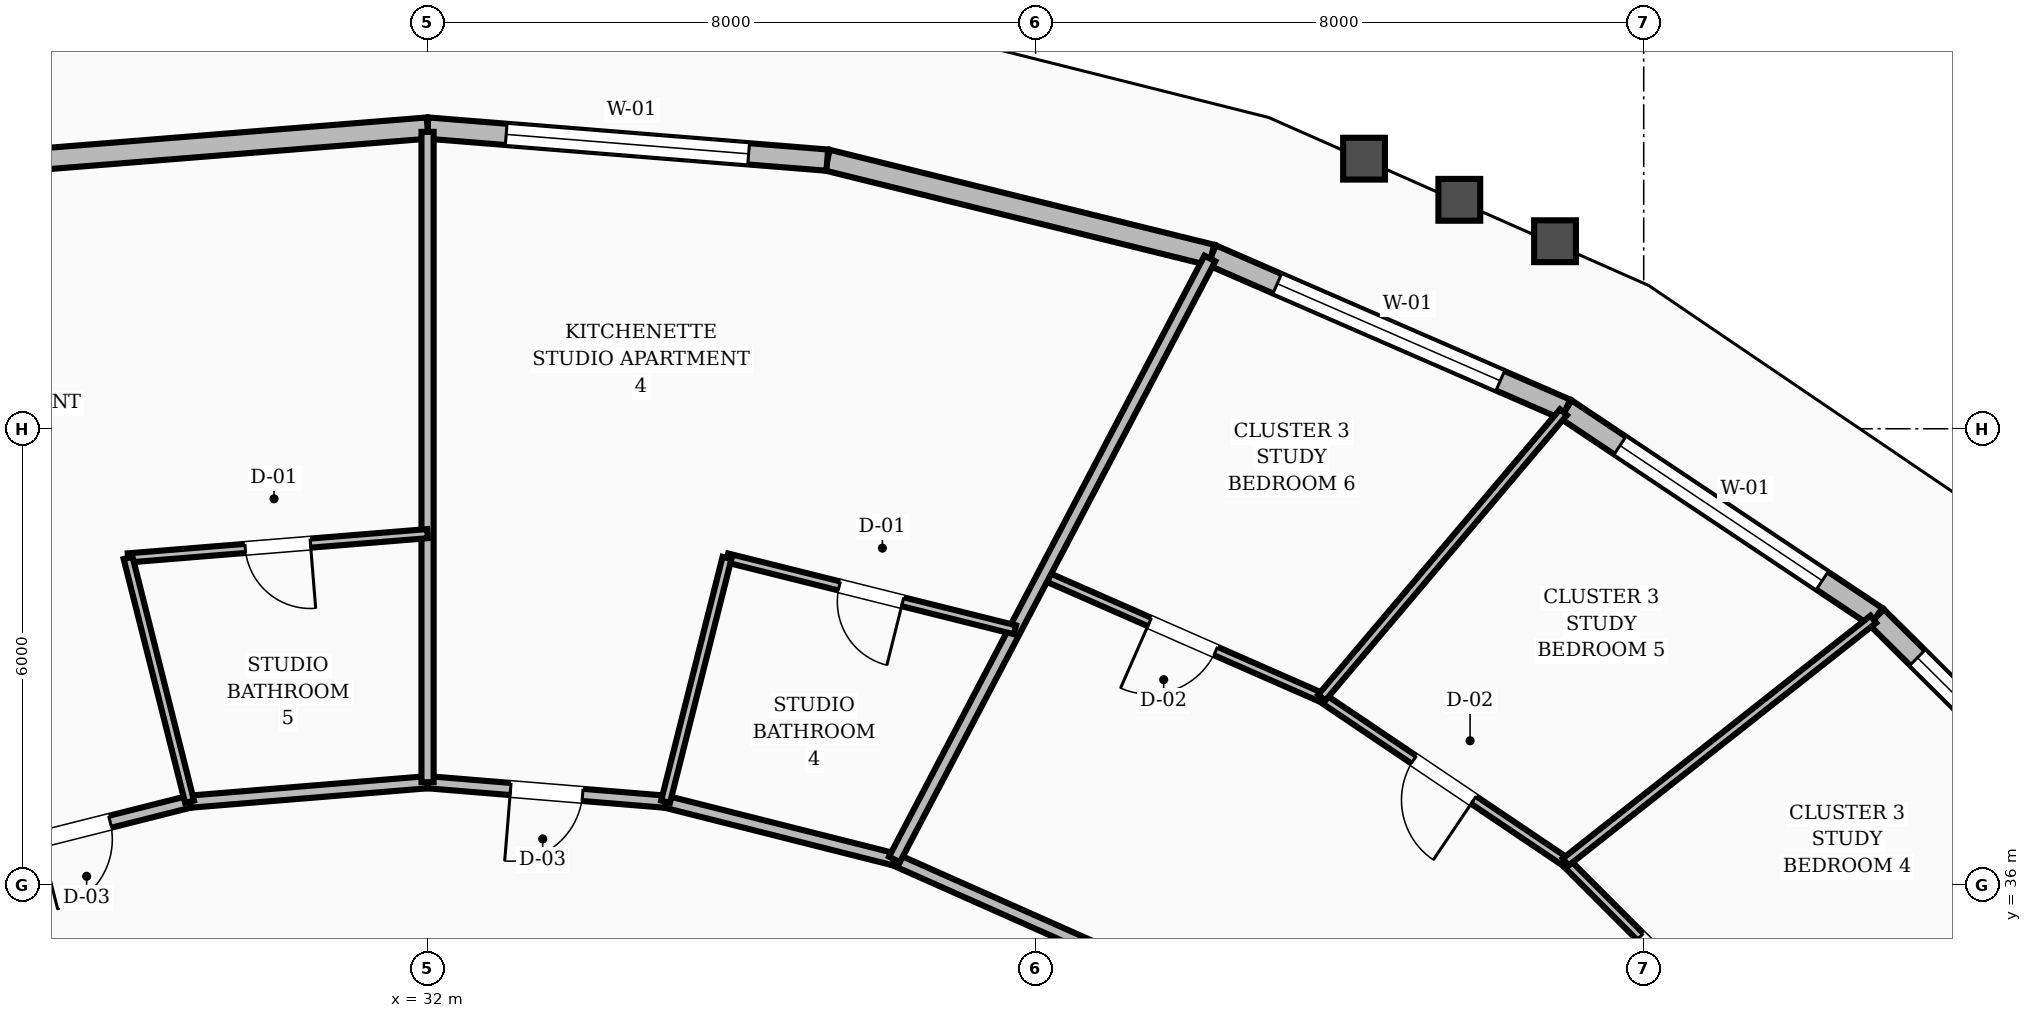
"""IFC4 building model, lengths in metres.
Left out: names, types, materials, properties, quantities, classifications, styles, units other than length and angle.
Written with IfcOpenShell. Run it as: python <this file> out.ifc"""

import sys

from ifc_helpers import new_model, si_unit, direction, frame, frame_2d, origin, place, context, subcontext, project, spatial, rectangle, extrude, element, fill, save


model = new_model("IFC4")
c1 = context("Model", 3, precision=1e-05, world=origin(), true_north=direction((0.0, 1.0)))
c2 = subcontext(c1, "Body", "Model", "MODEL_VIEW")
j1 = project(units=[si_unit("LENGTHUNIT", "METRE"), si_unit("PLANEANGLEUNIT", "RADIAN")], contexts=[c1])
p1 = place(None, origin())
s1 = spatial("IfcSite", under=j1, at=p1, CompositionType="ELEMENT")
p2 = place(p1, origin())
s2 = spatial("IfcBuilding", under=s1, at=p2, CompositionType="ELEMENT")
p3 = place(p2, frame((0.0, 0.0, 70.0)))
s3 = spatial("IfcBuildingStorey", under=s2, at=p3, CompositionType="ELEMENT", Elevation=70.0)
p4 = place(p3, frame((54.413, 36.198, 0.0), z_axis=(0.0, 0.0, 1.0), x_axis=(-0.709763836868, 0.704439703505, 0.0)))
e1 = element("IfcWall", 1, at=p4, inside=s3, PredefinedType="STANDARD", context=c2, shape_type="SweptSolid", body=[
    extrude(rectangle(XDim=4.723, YDim=0.28, at=frame_2d((2.362, 0.0))), origin(), (0.0, 0.0, 1.0), 2.71),
])
p5 = place(p4, frame((0.761, 0.0, 0.8)))
e2 = element("IfcOpeningElement", 2, at=p5, cuts=e1, PredefinedType="OPENING", context=c2, shape_type="SweptSolid", body=[
    extrude(rectangle(XDim=3.2, YDim=1.65, at=frame_2d((1.6, 0.825))), frame((0.0, 0.15, 0.0), z_axis=(0.0, -1.0, 0.0), x_axis=(1.0, 0.0, 0.0)), (0.0, 0.0, 1.0), 0.3),
])
p6 = place(p3, frame((51.061, 39.525, 0.0), z_axis=(0.0, 0.0, 1.0), x_axis=(-0.831361640375, 0.555731790446, 0.0)))
e3 = element("IfcWall", 3, at=p6, inside=s3, PredefinedType="STANDARD", context=c2, shape_type="SweptSolid", body=[
    extrude(rectangle(XDim=4.913, YDim=0.28, at=frame_2d((2.457, 0.0))), origin(), (0.0, 0.0, 1.0), 2.71),
])
p7 = place(p6, frame((0.857, 0.0, 0.8)))
e4 = element("IfcOpeningElement", 4, at=p7, cuts=e3, PredefinedType="OPENING", context=c2, shape_type="SweptSolid", body=[
    extrude(rectangle(XDim=3.2, YDim=1.65, at=frame_2d((1.6, 0.825))), frame((0.0, 0.15, 0.0), z_axis=(0.0, -1.0, 0.0), x_axis=(1.0, 0.0, 0.0)), (0.0, 0.0, 1.0), 0.3),
])
p8 = place(p3, frame((46.976, 42.256, 0.0), z_axis=(0.0, 0.0, 1.0), x_axis=(-0.916886688659, 0.399147591951, 0.0)))
e5 = element("IfcWall", 5, at=p8, inside=s3, PredefinedType="STANDARD", context=c2, shape_type="SweptSolid", body=[
    extrude(rectangle(XDim=5.083, YDim=0.28, at=frame_2d((2.542, 0.0))), origin(), (0.0, 0.0, 1.0), 2.71),
])
p9 = place(p8, frame((0.941, 0.0, 0.8)))
e6 = element("IfcOpeningElement", 6, at=p9, cuts=e5, PredefinedType="OPENING", context=c2, shape_type="SweptSolid", body=[
    extrude(rectangle(XDim=3.2, YDim=1.65, at=frame_2d((1.6, 0.825))), frame((0.0, 0.15, 0.0), z_axis=(0.0, -1.0, 0.0), x_axis=(1.0, 0.0, 0.0)), (0.0, 0.0, 1.0), 0.3),
])
p10 = place(p3, frame((42.315, 44.284, 0.0), z_axis=(0.0, 0.0, 1.0), x_axis=(-0.970800603404, 0.239887866368, 0.0)))
e7 = element("IfcWall", 7, at=p10, inside=s3, PredefinedType="STANDARD", context=c2, shape_type="SweptSolid", body=[
    extrude(rectangle(XDim=5.209, YDim=0.28, at=frame_2d((2.604, 0.0))), origin(), (0.0, 0.0, 1.0), 2.71),
])
p11 = place(p3, frame((37.259, 45.534, 0.0), z_axis=(0.0, 0.0, 1.0), x_axis=(-0.996797596899, 0.07996593535, 0.0)))
e8 = element("IfcWall", 8, at=p11, inside=s3, PredefinedType="STANDARD", context=c2, shape_type="SweptSolid", body=[
    extrude(rectangle(XDim=5.276, YDim=0.28, at=frame_2d((2.638, 0.0))), origin(), (0.0, 0.0, 1.0), 2.71),
])
p12 = place(p11, frame((1.038, 0.0, 0.8)))
e9 = element("IfcOpeningElement", 9, at=p12, cuts=e8, PredefinedType="OPENING", context=c2, shape_type="SweptSolid", body=[
    extrude(rectangle(XDim=3.2, YDim=1.65, at=frame_2d((1.6, 0.825))), frame((0.0, 0.15, 0.0), z_axis=(0.0, -1.0, 0.0), x_axis=(1.0, 0.0, 0.0)), (0.0, 0.0, 1.0), 0.3),
])
p13 = place(p3, frame((32.0, 45.956, 0.0), z_axis=(0.0, 0.0, 1.0), x_axis=(-0.996797596899, -0.07996593535, 0.0)))
e10 = element("IfcWall", 10, at=p13, inside=s3, PredefinedType="STANDARD", context=c2, shape_type="SweptSolid", body=[
    extrude(rectangle(XDim=5.276, YDim=0.28, at=frame_2d((2.638, 0.0))), origin(), (0.0, 0.0, 1.0), 2.71),
])
p14 = place(p3, frame((40.917, 35.1, 0.0), z_axis=(0.0, 0.0, 1.0), x_axis=(-0.913768445178, 0.406235434936, 0.0)))
e11 = element("IfcWall", 11, at=p14, inside=s3, PredefinedType="SOLIDWALL", context=c2, shape_type="SweptSolid", body=[
    extrude(rectangle(XDim=3.037, YDim=0.16, at=frame_2d((1.519, 0.0))), origin(), (0.0, 0.0, 1.0), 2.71),
])
p15 = place(p3, frame((38.142, 36.334, 0.0), z_axis=(0.0, 0.0, 1.0), x_axis=(-0.969608333194, 0.244662380029, 0.0)))
e12 = element("IfcWall", 12, at=p15, inside=s3, PredefinedType="SOLIDWALL", context=c2, shape_type="SweptSolid", body=[
    extrude(rectangle(XDim=3.105, YDim=0.16, at=frame_2d((1.553, 0.0))), origin(), (0.0, 0.0, 1.0), 2.71),
])
p16 = place(p3, frame((35.131, 37.094, 0.0), z_axis=(0.0, 0.0, 1.0), x_axis=(-0.996658973252, 0.081675522876, 0.0)))
e13 = element("IfcWall", 13, at=p16, inside=s3, PredefinedType="SOLIDWALL", context=c2, shape_type="SweptSolid", body=[
    extrude(rectangle(XDim=3.142, YDim=0.16, at=frame_2d((1.571, 0.0))), origin(), (0.0, 0.0, 1.0), 2.71),
])
p17 = place(p16, frame((1.096, 0.0, 0.0)))
e14 = element("IfcOpeningElement", 14, at=p17, cuts=e13, PredefinedType="OPENING", context=c2, shape_type="SweptSolid", body=[
    extrude(rectangle(XDim=0.95, YDim=2.1, at=frame_2d((0.475, 1.05))), frame((0.0, 0.09, 0.0), z_axis=(0.0, -1.0, 0.0), x_axis=(1.0, 0.0, 0.0)), (0.0, 0.0, 1.0), 0.18),
])
p18 = place(p3, frame((32.0, 37.35, 0.0), z_axis=(0.0, 0.0, 1.0), x_axis=(-0.996658973252, -0.081675522876, 0.0)))
e15 = element("IfcWall", 15, at=p18, inside=s3, PredefinedType="SOLIDWALL", context=c2, shape_type="SweptSolid", body=[
    extrude(rectangle(XDim=3.142, YDim=0.16, at=frame_2d((1.571, 0.0))), origin(), (0.0, 0.0, 1.0), 2.71),
])
p19 = place(p3, frame((28.869, 37.094, 0.0), z_axis=(0.0, 0.0, 1.0), x_axis=(-0.969608333194, -0.244662380029, 0.0)))
e16 = element("IfcWall", 16, at=p19, inside=s3, PredefinedType="SOLIDWALL", context=c2, shape_type="SweptSolid", body=[
    extrude(rectangle(XDim=3.105, YDim=0.16, at=frame_2d((1.553, 0.0))), origin(), (0.0, 0.0, 1.0), 2.71),
])
p20 = place(p19, frame((1.078, 0.0, 0.0)))
e17 = element("IfcOpeningElement", 17, at=p20, cuts=e16, PredefinedType="OPENING", context=c2, shape_type="SweptSolid", body=[
    extrude(rectangle(XDim=0.95, YDim=2.1, at=frame_2d((0.475, 1.05))), frame((0.0, 0.09, 0.0), z_axis=(0.0, -1.0, 0.0), x_axis=(1.0, 0.0, 0.0)), (0.0, 0.0, 1.0), 0.18),
])
p21 = place(p3, frame((49.607, 33.664, 0.0), z_axis=(0.0, 0.0, 1.0), x_axis=(-0.706811859844, 0.707401579575, 0.0)))
e18 = element("IfcWall", 18, at=p21, inside=s3, PredefinedType="PARTITIONING", context=c2, shape_type="SweptSolid", body=[
    extrude(rectangle(XDim=3.726, YDim=0.12, at=frame_2d((1.863, 0.0))), origin(), (0.0, 0.0, 1.0), 2.71),
])
p22 = place(p21, frame((1.388, 0.0, 0.0)))
e19 = element("IfcOpeningElement", 19, at=p22, cuts=e18, PredefinedType="OPENING", context=c2, shape_type="SweptSolid", body=[
    extrude(rectangle(XDim=0.95, YDim=2.1, at=frame_2d((0.475, 1.05))), frame((0.0, 0.07, 0.0), z_axis=(0.0, -1.0, 0.0), x_axis=(1.0, 0.0, 0.0)), (0.0, 0.0, 1.0), 0.14),
])
p23 = place(p3, frame((49.607, 33.664, 0.0), z_axis=(0.0, 0.0, 1.0), x_axis=(0.884567739653, 0.466411742955, 0.0)))
e20 = element("IfcWall", 20, at=p23, inside=s3, PredefinedType="PARTITIONING", context=c2, shape_type="SweptSolid", body=[
    extrude(rectangle(XDim=5.383, YDim=0.12, at=frame_2d((2.691, 0.0))), origin(), (0.0, 0.0, 1.0), 2.71),
])
p24 = place(p3, frame((46.973, 36.3, 0.0), z_axis=(0.0, 0.0, 1.0), x_axis=(-0.829156454693, 0.559016613028, 0.0)))
e21 = element("IfcWall", 21, at=p24, inside=s3, PredefinedType="PARTITIONING", context=c2, shape_type="SweptSolid", body=[
    extrude(rectangle(XDim=3.87, YDim=0.12, at=frame_2d((1.935, 0.0))), origin(), (0.0, 0.0, 1.0), 2.71),
])
p25 = place(p24, frame((1.46, 0.0, 0.0)))
e22 = element("IfcOpeningElement", 22, at=p25, cuts=e21, PredefinedType="OPENING", context=c2, shape_type="SweptSolid", body=[
    extrude(rectangle(XDim=0.95, YDim=2.1, at=frame_2d((0.475, 1.05))), frame((0.0, 0.07, 0.0), z_axis=(0.0, -1.0, 0.0), x_axis=(1.0, 0.0, 0.0)), (0.0, 0.0, 1.0), 0.14),
])
p26 = place(p3, frame((46.973, 36.3, 0.0), z_axis=(0.0, 0.0, 1.0), x_axis=(0.785008791787, 0.619484621938, 0.0)))
e23 = element("IfcWall", 23, at=p26, inside=s3, PredefinedType="PARTITIONING", context=c2, shape_type="SweptSolid", body=[
    extrude(rectangle(XDim=5.156, YDim=0.12, at=frame_2d((2.578, 0.0))), origin(), (0.0, 0.0, 1.0), 2.71),
])
p27 = place(p3, frame((43.765, 38.463, 0.0), z_axis=(0.0, 0.0, 1.0), x_axis=(-0.915635259457, 0.402010039228, 0.0)))
e24 = element("IfcWall", 24, at=p27, inside=s3, PredefinedType="PARTITIONING", context=c2, shape_type="SweptSolid", body=[
    extrude(rectangle(XDim=3.999, YDim=0.12, at=frame_2d((1.999, 0.0))), origin(), (0.0, 0.0, 1.0), 2.71),
])
p28 = place(p27, frame((1.524, 0.0, 0.0)))
e25 = element("IfcOpeningElement", 25, at=p28, cuts=e24, PredefinedType="OPENING", context=c2, shape_type="SweptSolid", body=[
    extrude(rectangle(XDim=0.95, YDim=2.1, at=frame_2d((0.475, 1.05))), frame((0.0, 0.07, 0.0), z_axis=(0.0, -1.0, 0.0), x_axis=(1.0, 0.0, 0.0)), (0.0, 0.0, 1.0), 0.14),
])
p29 = place(p3, frame((43.765, 38.463, 0.0), z_axis=(0.0, 0.0, 1.0), x_axis=(0.646222517635, 0.763149040294, 0.0)))
e26 = element("IfcWall", 26, at=p29, inside=s3, PredefinedType="PARTITIONING", context=c2, shape_type="SweptSolid", body=[
    extrude(rectangle(XDim=4.919, YDim=0.12, at=frame_2d((2.459, 0.0))), origin(), (0.0, 0.0, 1.0), 2.71),
])
p30 = place(p3, frame((38.142, 36.334, 0.0), z_axis=(0.0, 0.0, 1.0), x_axis=(0.464766918633, 0.885433064294, 0.0)))
e27 = element("IfcWall", 27, at=p30, inside=s3, PredefinedType="SOLIDWALL", context=c2, shape_type="SweptSolid", body=[
    extrude(rectangle(XDim=8.929, YDim=0.16, at=frame_2d((4.465, 0.0))), origin(), (0.0, 0.0, 1.0), 2.71),
])
p31 = place(p3, frame((39.728, 39.355, 0.0), z_axis=(0.0, 0.0, 1.0), x_axis=(-0.970219689249, 0.242226659544, 0.0)))
e28 = element("IfcWall", 28, at=p31, inside=s3, PredefinedType="PARTITIONING", context=c2, shape_type="SweptSolid", body=[
    extrude(rectangle(XDim=3.905, YDim=0.12, at=frame_2d((1.952, 0.0))), origin(), (0.0, 0.0, 1.0), 2.71),
])
p32 = place(p31, frame((1.522, 0.0, 0.0)))
e29 = element("IfcOpeningElement", 29, at=p32, cuts=e28, PredefinedType="OPENING", context=c2, shape_type="SweptSolid", body=[
    extrude(rectangle(XDim=0.86, YDim=2.1, at=frame_2d((0.43, 1.05))), frame((0.0, 0.07, 0.0), z_axis=(0.0, -1.0, 0.0), x_axis=(1.0, 0.0, 0.0)), (0.0, 0.0, 1.0), 0.14),
])
p33 = place(p3, frame((35.131, 37.094, 0.0), z_axis=(0.0, 0.0, 1.0), x_axis=(0.244462922871, 0.969658640626, 0.0)))
e30 = element("IfcWall", 30, at=p33, inside=s3, PredefinedType="PARTITIONING", context=c2, shape_type="SweptSolid", body=[
    extrude(rectangle(XDim=3.308, YDim=0.12, at=frame_2d((1.654, 0.0))), origin(), (0.0, 0.0, 1.0), 2.71),
])
p34 = place(p3, frame((32.0, 37.35, 0.0), z_axis=(0.0, 0.0, 1.0), x_axis=(0.0, 1.0, 0.0)))
e31 = element("IfcWall", 31, at=p34, inside=s3, PredefinedType="SOLIDWALL", context=c2, shape_type="SweptSolid", body=[
    extrude(rectangle(XDim=8.556, YDim=0.16, at=frame_2d((4.278, 0.0))), origin(), (0.0, 0.0, 1.0), 2.71),
])
p35 = place(p3, frame((32.0, 40.62, 0.0), z_axis=(0.0, 0.0, 1.0), x_axis=(-0.996731064863, -0.080790991686, 0.0)))
e32 = element("IfcWall", 32, at=p35, inside=s3, PredefinedType="PARTITIONING", context=c2, shape_type="SweptSolid", body=[
    extrude(rectangle(XDim=3.953, YDim=0.12, at=frame_2d((1.976, 0.0))), origin(), (0.0, 0.0, 1.0), 2.71),
])
p36 = place(p35, frame((1.546, 0.0, 0.0)))
e33 = element("IfcOpeningElement", 33, at=p36, cuts=e32, PredefinedType="OPENING", context=c2, shape_type="SweptSolid", body=[
    extrude(rectangle(XDim=0.86, YDim=2.1, at=frame_2d((0.43, 1.05))), frame((0.0, 0.07, 0.0), z_axis=(0.0, -1.0, 0.0), x_axis=(1.0, 0.0, 0.0)), (0.0, 0.0, 1.0), 0.14),
])
p37 = place(p3, frame((28.869, 37.094, 0.0), z_axis=(0.0, 0.0, 1.0), x_axis=(-0.244462922871, 0.969658640626, 0.0)))
e34 = element("IfcWall", 34, at=p37, inside=s3, PredefinedType="PARTITIONING", context=c2, shape_type="SweptSolid", body=[
    extrude(rectangle(XDim=3.308, YDim=0.12, at=frame_2d((1.654, 0.0))), origin(), (0.0, 0.0, 1.0), 2.71),
])
p38 = place(p5, origin())
e35 = element("IfcWindow", 35, at=p38, inside=s3, PartitioningType="SINGLE_PANEL", PredefinedType="WINDOW", context=c2, shape_type="SweptSolid", body=[
    extrude(rectangle(XDim=3.2, YDim=1.65, at=frame_2d((1.6, 0.825))), frame((0.0, 0.03, 0.0), z_axis=(0.0, -1.0, 0.0), x_axis=(1.0, 0.0, 0.0)), (0.0, 0.0, 1.0), 0.06),
])
fill(e2, e35)
p39 = place(p7, origin())
e36 = element("IfcWindow", 36, at=p39, inside=s3, PartitioningType="SINGLE_PANEL", PredefinedType="WINDOW", context=c2, shape_type="SweptSolid", body=[
    extrude(rectangle(XDim=3.2, YDim=1.65, at=frame_2d((1.6, 0.825))), frame((0.0, 0.03, 0.0), z_axis=(0.0, -1.0, 0.0), x_axis=(1.0, 0.0, 0.0)), (0.0, 0.0, 1.0), 0.06),
])
fill(e4, e36)
p40 = place(p9, origin())
e37 = element("IfcWindow", 37, at=p40, inside=s3, PartitioningType="SINGLE_PANEL", PredefinedType="WINDOW", context=c2, shape_type="SweptSolid", body=[
    extrude(rectangle(XDim=3.2, YDim=1.65, at=frame_2d((1.6, 0.825))), frame((0.0, 0.03, 0.0), z_axis=(0.0, -1.0, 0.0), x_axis=(1.0, 0.0, 0.0)), (0.0, 0.0, 1.0), 0.06),
])
fill(e6, e37)
p41 = place(p12, origin())
e38 = element("IfcWindow", 38, at=p41, inside=s3, PartitioningType="SINGLE_PANEL", PredefinedType="WINDOW", context=c2, shape_type="SweptSolid", body=[
    extrude(rectangle(XDim=3.2, YDim=1.65, at=frame_2d((1.6, 0.825))), frame((0.0, 0.03, 0.0), z_axis=(0.0, -1.0, 0.0), x_axis=(1.0, 0.0, 0.0)), (0.0, 0.0, 1.0), 0.06),
])
fill(e9, e38)
p42 = place(p22, origin())
e39 = element("IfcDoor", 39, at=p42, inside=s3, OperationType="SINGLE_SWING_RIGHT", PredefinedType="DOOR", context=c2, shape_type="SweptSolid", body=[
    extrude(rectangle(XDim=0.95, YDim=2.1, at=frame_2d((0.475, 1.05))), frame((0.0, 0.025, 0.0), z_axis=(0.0, -1.0, 0.0), x_axis=(1.0, 0.0, 0.0)), (0.0, 0.0, 1.0), 0.05),
])
fill(e19, e39)
p43 = place(p25, origin())
e40 = element("IfcDoor", 40, at=p43, inside=s3, OperationType="SINGLE_SWING_LEFT", PredefinedType="DOOR", context=c2, shape_type="SweptSolid", body=[
    extrude(rectangle(XDim=0.95, YDim=2.1, at=frame_2d((0.475, 1.05))), frame((0.0, 0.025, 0.0), z_axis=(0.0, -1.0, 0.0), x_axis=(1.0, 0.0, 0.0)), (0.0, 0.0, 1.0), 0.05),
])
fill(e22, e40)
p44 = place(p28, origin())
e41 = element("IfcDoor", 41, at=p44, inside=s3, OperationType="SINGLE_SWING_RIGHT", PredefinedType="DOOR", context=c2, shape_type="SweptSolid", body=[
    extrude(rectangle(XDim=0.95, YDim=2.1, at=frame_2d((0.475, 1.05))), frame((0.0, 0.025, 0.0), z_axis=(0.0, -1.0, 0.0), x_axis=(1.0, 0.0, 0.0)), (0.0, 0.0, 1.0), 0.05),
])
fill(e25, e41)
p45 = place(p32, origin())
e42 = element("IfcDoor", 42, at=p45, inside=s3, OperationType="SINGLE_SWING_LEFT", PredefinedType="DOOR", context=c2, shape_type="SweptSolid", body=[
    extrude(rectangle(XDim=0.86, YDim=2.1, at=frame_2d((0.43, 1.05))), frame((0.0, 0.025, 0.0), z_axis=(0.0, -1.0, 0.0), x_axis=(1.0, 0.0, 0.0)), (0.0, 0.0, 1.0), 0.05),
])
fill(e29, e42)
p46 = place(p17, origin())
e43 = element("IfcDoor", 43, at=p46, inside=s3, OperationType="SINGLE_SWING_RIGHT", PredefinedType="DOOR", context=c2, shape_type="SweptSolid", body=[
    extrude(rectangle(XDim=0.95, YDim=2.1, at=frame_2d((0.475, 1.05))), frame((0.0, 0.025, 0.0), z_axis=(0.0, -1.0, 0.0), x_axis=(1.0, 0.0, 0.0)), (0.0, 0.0, 1.0), 0.05),
])
fill(e14, e43)
p47 = place(p36, origin())
e44 = element("IfcDoor", 44, at=p47, inside=s3, OperationType="SINGLE_SWING_LEFT", PredefinedType="DOOR", context=c2, shape_type="SweptSolid", body=[
    extrude(rectangle(XDim=0.86, YDim=2.1, at=frame_2d((0.43, 1.05))), frame((0.0, 0.025, 0.0), z_axis=(0.0, -1.0, 0.0), x_axis=(1.0, 0.0, 0.0)), (0.0, 0.0, 1.0), 0.05),
])
fill(e33, e44)
p48 = place(p20, origin())
e45 = element("IfcDoor", 45, at=p48, inside=s3, OperationType="SINGLE_SWING_RIGHT", PredefinedType="DOOR", context=c2, shape_type="SweptSolid", body=[
    extrude(rectangle(XDim=0.95, YDim=2.1, at=frame_2d((0.475, 1.05))), frame((0.0, 0.025, 0.0), z_axis=(0.0, -1.0, 0.0), x_axis=(1.0, 0.0, 0.0)), (0.0, 0.0, 1.0), 0.05),
])
fill(e17, e45)
save(model, sys.argv[1])
